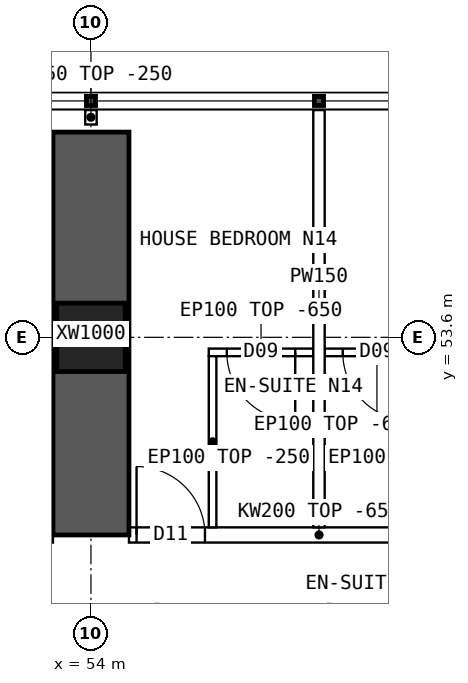
"""IFC4 building model, lengths in metres.
Left out: names, types, materials, properties, quantities, classifications, styles, units other than length and angle.
Written with IfcOpenShell. Run it as: python <this file> out.ifc"""

import sys

from ifc_helpers import new_model, si_unit, direction, frame, frame_2d, origin, origin_2d, place, context, subcontext, project, spatial, polyline, rectangle, hollow_rectangle, outline, extrude, element, fill, save


model = new_model("IFC4")
c1 = context("Model", 3, precision=1e-05, world=origin(), true_north=direction((0.0, 1.0)))
c2 = subcontext(c1, "Body", "Model", "MODEL_VIEW")
j1 = project(units=[si_unit("LENGTHUNIT", "METRE"), si_unit("PLANEANGLEUNIT", "RADIAN")], contexts=[c1])
p1 = place(None, origin())
s1 = spatial("IfcSite", under=j1, at=p1, CompositionType="ELEMENT")
p2 = place(p1, origin())
s2 = spatial("IfcBuilding", under=s1, at=p2, CompositionType="ELEMENT")
p3 = place(p2, frame((0.0, 0.0, 31.45)))
s3 = spatial("IfcBuildingStorey", under=s2, at=p3, CompositionType="ELEMENT", Elevation=31.45)
p4 = place(p3, frame((54.0, 53.6, 0.0), z_axis=(0.0, 0.0, 1.0), x_axis=(1.0, 0.0, 0.0)))
e1 = element("IfcColumn", 1, at=p4, inside=s3, PredefinedType="COLUMN", context=c2, shape_type="SweptSolid", body=[
    extrude(hollow_rectangle(XDim=0.9, YDim=0.9, WallThickness=0.09, at=origin_2d()), origin(), (0.0, 0.0, 1.0), 3.75),
])
p5 = place(p3, frame((54.0, 51.0, 0.0), z_axis=(0.0, 0.0, 1.0), x_axis=(0.0, 1.0, 0.0)))
e2 = element("IfcWall", 2, at=p5, inside=s3, PredefinedType="SHEAR", context=c2, shape_type="SweptSolid", body=[
    extrude(rectangle(XDim=5.3, YDim=1.0, at=frame_2d((2.65, 0.0))), origin(), (0.0, 0.0, 1.0), 3.75),
])
p6 = place(p3, frame((54.5, 51.0, 0.0), z_axis=(0.0, 0.0, 1.0), x_axis=(1.0, 0.0, 0.0)))
e3 = element("IfcWall", 3, at=p6, inside=s3, PredefinedType="SOLIDWALL", context=c2, shape_type="SweptSolid", body=[
    extrude(outline(polyline([(0.0, 0.0), (5.0, 0.0), (5.0, 3.1), (0.0, 3.1), (0.0, 0.0)])), frame((0.0, 0.1, 0.0), z_axis=(0.0, -1.0, 0.0), x_axis=(1.0, 0.0, 0.0)), (0.0, 0.0, 1.0), 0.2),
])
p7 = place(p6, frame((0.1, 0.0, 0.0)))
e4 = element("IfcOpeningElement", 4, at=p7, cuts=e3, PredefinedType="OPENING", context=c2, shape_type="SweptSolid", body=[
    extrude(rectangle(XDim=0.9, YDim=2.1, at=frame_2d((0.45, 1.05))), frame((0.0, 0.11, 0.0), z_axis=(0.0, -1.0, 0.0), x_axis=(1.0, 0.0, 0.0)), (0.0, 0.0, 1.0), 0.22),
])
p8 = place(p6, frame((4.0, 0.0, 0.0)))
e5 = element("IfcOpeningElement", 5, at=p8, cuts=e3, PredefinedType="OPENING", context=c2, shape_type="SweptSolid", body=[
    extrude(rectangle(XDim=0.9, YDim=2.1, at=frame_2d((0.45, 1.05))), frame((0.0, 0.11, 0.0), z_axis=(0.0, -1.0, 0.0), x_axis=(1.0, 0.0, 0.0)), (0.0, 0.0, 1.0), 0.22),
])
p9 = place(p3, frame((57.0, 56.59, 0.0), z_axis=(0.0, 0.0, 1.0), x_axis=(0.0, -1.0, 0.0)))
e6 = element("IfcWall", 6, at=p9, inside=s3, PredefinedType="PARTITIONING", context=c2, shape_type="SweptSolid", body=[
    extrude(outline(polyline([(0.0, 0.0), (5.49, 0.0), (5.49, 3.1), (5.442, 3.1), (5.44, 3.5), (3.192, 3.5), (3.19, 3.1), (2.792, 3.1), (2.79, 3.5), (0.0, 3.5), (0.0, 0.0)])), frame((0.0, 0.075, 0.0), z_axis=(0.0, -1.0, 0.0), x_axis=(1.0, 0.0, 0.0)), (0.0, 0.0, 1.0), 0.15),
])
p10 = place(p3, frame((55.55, 53.402, 0.0), z_axis=(0.0, 0.0, 1.0), x_axis=(1.0, 0.0, 0.0)))
e7 = element("IfcWall", 7, at=p10, inside=s3, PredefinedType="PARTITIONING", context=c2, shape_type="SweptSolid", body=[
    extrude(outline(polyline([(0.0, 0.0), (1.375, 0.0), (1.375, 3.1), (0.0, 3.1), (0.0, 0.0)])), frame((0.0, 0.05, 0.0), z_axis=(0.0, -1.0, 0.0), x_axis=(1.0, 0.0, 0.0)), (0.0, 0.0, 1.0), 0.1),
])
p11 = place(p10, frame((0.238, 0.0, 0.0)))
e8 = element("IfcOpeningElement", 8, at=p11, cuts=e7, PredefinedType="OPENING", context=c2, shape_type="SweptSolid", body=[
    extrude(rectangle(XDim=0.9, YDim=2.1, at=frame_2d((0.45, 1.05))), frame((0.0, 0.06, 0.0), z_axis=(0.0, -1.0, 0.0), x_axis=(1.0, 0.0, 0.0)), (0.0, 0.0, 1.0), 0.12),
])
p12 = place(p3, frame((55.6, 53.352, 0.0), z_axis=(0.0, 0.0, 1.0), x_axis=(0.0, -1.0, 0.0)))
e9 = element("IfcWall", 9, at=p12, inside=s3, PredefinedType="PARTITIONING", context=c2, shape_type="SweptSolid", body=[
    extrude(outline(polyline([(0.0, 0.0), (2.252, 0.0), (2.252, 3.1), (2.204, 3.1), (2.202, 3.5), (0.0, 3.5), (0.0, 0.0)])), frame((0.0, 0.05, 0.0), z_axis=(0.0, -1.0, 0.0), x_axis=(1.0, 0.0, 0.0)), (0.0, 0.0, 1.0), 0.1),
])
p13 = place(p3, frame((57.075, 53.402, 0.0), z_axis=(0.0, 0.0, 1.0), x_axis=(1.0, 0.0, 0.0)))
e10 = element("IfcWall", 10, at=p13, inside=s3, PredefinedType="PARTITIONING", context=c2, shape_type="SweptSolid", body=[
    extrude(outline(polyline([(0.0, 0.0), (1.375, 0.0), (1.375, 3.1), (0.0, 3.1), (0.0, 0.0)])), frame((0.0, 0.05, 0.0), z_axis=(0.0, -1.0, 0.0), x_axis=(1.0, 0.0, 0.0)), (0.0, 0.0, 1.0), 0.1),
])
p14 = place(p13, frame((0.238, 0.0, 0.0)))
e11 = element("IfcOpeningElement", 11, at=p14, cuts=e10, PredefinedType="OPENING", context=c2, shape_type="SweptSolid", body=[
    extrude(rectangle(XDim=0.9, YDim=2.1, at=frame_2d((0.45, 1.05))), frame((0.0, 0.06, 0.0), z_axis=(0.0, -1.0, 0.0), x_axis=(1.0, 0.0, 0.0)), (0.0, 0.0, 1.0), 0.12),
])
p15 = place(p3, frame((54.0, 56.4, 0.0), z_axis=(0.0, 0.0, 1.0), x_axis=(0.0, 1.0, 0.0)))
e12 = element("IfcWall", 12, at=p15, inside=s3, PredefinedType="PARTITIONING", context=c2, shape_type="SweptSolid", body=[
    extrude(rectangle(XDim=0.19, YDim=0.15, at=frame_2d((0.095, 0.0))), origin(), (0.0, 0.0, 1.0), 3.5),
])
p16 = place(p11, origin())
e13 = element("IfcDoor", 13, at=p16, inside=s3, OperationType="SINGLE_SWING_RIGHT", PredefinedType="DOOR", context=c2, shape_type="SweptSolid", body=[
    extrude(rectangle(XDim=0.9, YDim=2.1, at=frame_2d((0.45, 1.05))), frame((0.0, 0.025, 0.0), z_axis=(0.0, -1.0, 0.0), x_axis=(1.0, 0.0, 0.0)), (0.0, 0.0, 1.0), 0.05),
])
fill(e8, e13)
p17 = place(p7, origin())
e14 = element("IfcDoor", 14, at=p17, inside=s3, OperationType="SINGLE_SWING_LEFT", PredefinedType="DOOR", context=c2, shape_type="SweptSolid", body=[
    extrude(rectangle(XDim=0.9, YDim=2.1, at=frame_2d((0.45, 1.05))), frame((0.0, 0.025, 0.0), z_axis=(0.0, -1.0, 0.0), x_axis=(1.0, 0.0, 0.0)), (0.0, 0.0, 1.0), 0.05),
])
fill(e4, e14)
p18 = place(p14, origin())
e15 = element("IfcDoor", 15, at=p18, inside=s3, OperationType="SINGLE_SWING_RIGHT", PredefinedType="DOOR", context=c2, shape_type="SweptSolid", body=[
    extrude(rectangle(XDim=0.9, YDim=2.1, at=frame_2d((0.45, 1.05))), frame((0.0, 0.025, 0.0), z_axis=(0.0, -1.0, 0.0), x_axis=(1.0, 0.0, 0.0)), (0.0, 0.0, 1.0), 0.05),
])
fill(e11, e15)
save(model, sys.argv[1])
